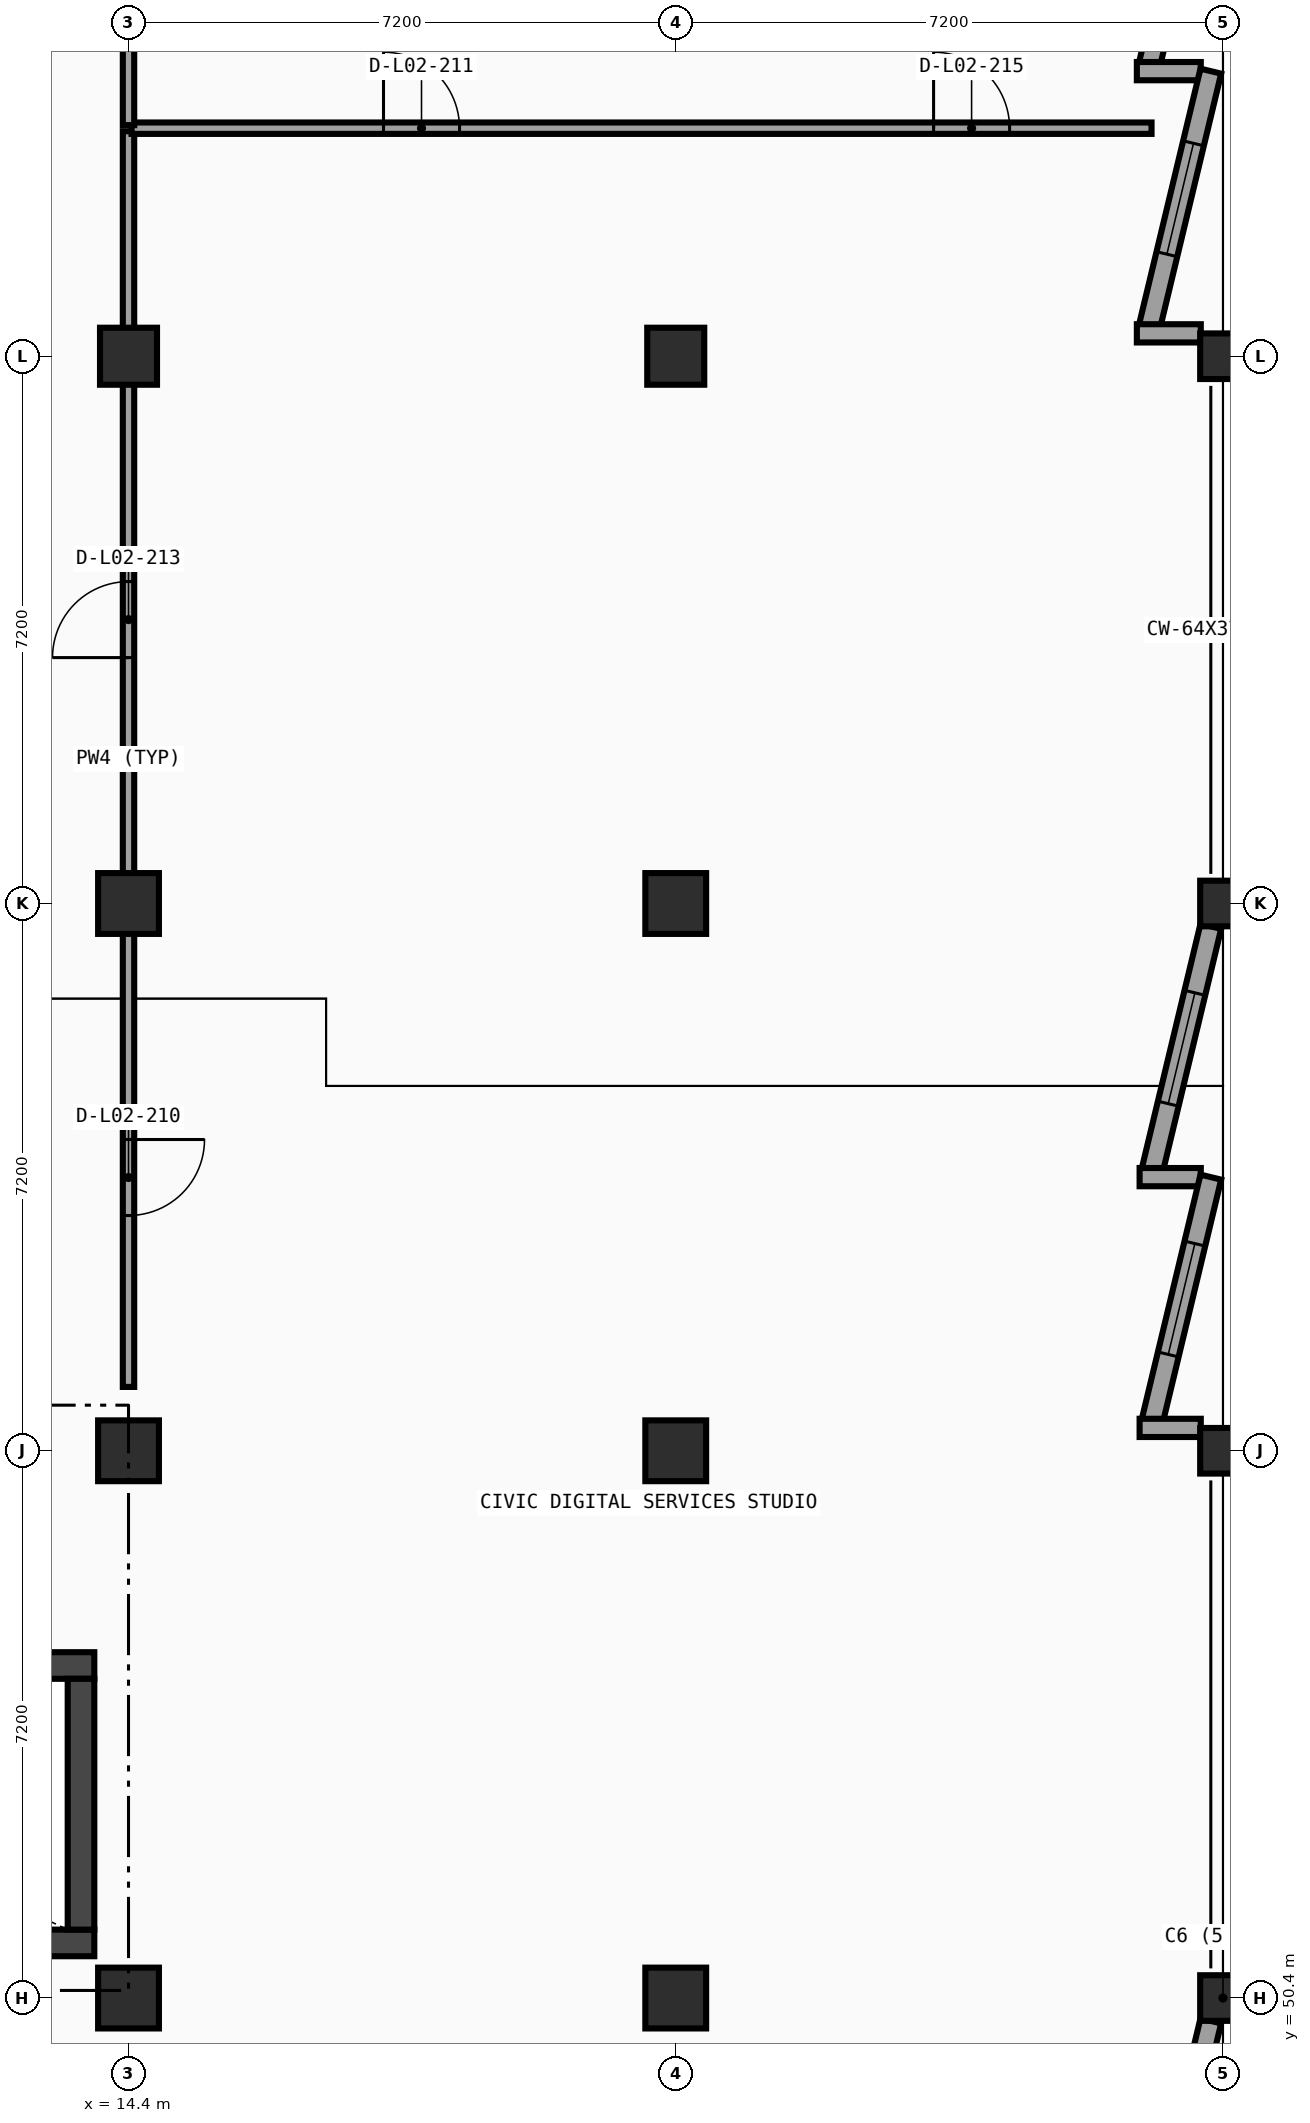
"""IFC4 building model, lengths in metres.
Left out: names, types, materials, properties, quantities, classifications, styles, units other than length and angle.
Written with IfcOpenShell. Run it as: python <this file> out.ifc"""

import sys

from ifc_helpers import new_model, si_unit, direction, frame, frame_2d, origin, origin_2d, place, context, subcontext, project, spatial, rectangle, extrude, element, fill, save


model = new_model("IFC4")
c1 = context("Model", 3, precision=1e-05, world=origin(), true_north=direction((0.0, 1.0)))
c2 = subcontext(c1, "Body", "Model", "MODEL_VIEW")
j1 = project(units=[si_unit("LENGTHUNIT", "METRE"), si_unit("PLANEANGLEUNIT", "RADIAN")], contexts=[c1])
p1 = place(None, origin())
s1 = spatial("IfcSite", under=j1, at=p1, CompositionType="ELEMENT")
p2 = place(p1, origin())
s2 = spatial("IfcBuilding", under=s1, at=p2, CompositionType="ELEMENT")
p3 = place(p2, frame((0.0, 0.0, 10.2)))
s3 = spatial("IfcBuildingStorey", under=s2, at=p3, CompositionType="ELEMENT", Elevation=10.2)
for number, where, z_axis, x_axis in (
    (1, (14.4, 50.4, 0.0), (0.0, 0.0, 1.0), (1.0, 0.0, 0.0)),
    (2, (14.4, 57.6, 0.0), (0.0, 0.0, 1.0), (1.0, 0.0, 0.0)),
    (3, (14.4, 64.8, 0.0), (0.0, 0.0, 1.0), (1.0, 0.0, 0.0)),
):
    element("IfcColumn", number, at=place(p3, frame(where, z_axis=z_axis, x_axis=x_axis)), inside=s3, PredefinedType="COLUMN", context=c2, shape_type="SweptSolid", body=[
        extrude(rectangle(XDim=0.8, YDim=0.8, at=origin_2d()), origin(), (0.0, 0.0, 1.0), 4.5),
    ])
p4 = place(p3, frame((14.4, 72.0, 0.0), z_axis=(0.0, 0.0, 1.0), x_axis=(1.0, 0.0, 0.0)))
e4 = element("IfcColumn", 4, at=p4, inside=s3, PredefinedType="COLUMN", context=c2, shape_type="SweptSolid", body=[
    extrude(rectangle(XDim=0.75, YDim=0.75, at=origin_2d()), origin(), (0.0, 0.0, 1.0), 4.5),
])
for number, where, z_axis, x_axis in (
    (5, (21.6, 50.4, 0.0), (0.0, 0.0, 1.0), (1.0, 0.0, 0.0)),
    (6, (21.6, 57.6, 0.0), (0.0, 0.0, 1.0), (1.0, 0.0, 0.0)),
    (7, (21.6, 64.8, 0.0), (0.0, 0.0, 1.0), (1.0, 0.0, 0.0)),
):
    element("IfcColumn", number, at=place(p3, frame(where, z_axis=z_axis, x_axis=x_axis)), inside=s3, PredefinedType="COLUMN", context=c2, shape_type="SweptSolid", body=[
        extrude(rectangle(XDim=0.8, YDim=0.8, at=origin_2d()), origin(), (0.0, 0.0, 1.0), 4.5),
    ])
p5 = place(p3, frame((21.6, 72.0, 0.0), z_axis=(0.0, 0.0, 1.0), x_axis=(1.0, 0.0, 0.0)))
e8 = element("IfcColumn", 8, at=p5, inside=s3, PredefinedType="COLUMN", context=c2, shape_type="SweptSolid", body=[
    extrude(rectangle(XDim=0.75, YDim=0.75, at=origin_2d()), origin(), (0.0, 0.0, 1.0), 4.5),
])
for number, where, z_axis, x_axis in (
    (9, (28.8, 50.4, 0.0), (0.0, 0.0, 1.0), (1.0, 0.0, 0.0)),
    (10, (28.8, 57.6, 0.0), (0.0, 0.0, 1.0), (1.0, 0.0, 0.0)),
    (11, (28.8, 64.8, 0.0), (0.0, 0.0, 1.0), (1.0, 0.0, 0.0)),
    (12, (28.8, 72.0, 0.0), (0.0, 0.0, 1.0), (1.0, 0.0, 0.0)),
):
    element("IfcColumn", number, at=place(p3, frame(where, z_axis=z_axis, x_axis=x_axis)), inside=s3, PredefinedType="COLUMN", context=c2, shape_type="SweptSolid", body=[
        extrude(rectangle(XDim=0.6, YDim=0.6, at=origin_2d()), origin(), (0.0, 0.0, 1.0), 4.5),
    ])
p6 = place(p3, frame((28.64, 79.2, 0.0), z_axis=(0.0, 0.0, 1.0), x_axis=(-0.233439818328, -0.972371251744, 0.0)))
e13 = element("IfcWall", 13, at=p6, inside=s3, PredefinedType="SOLIDWALL", context=c2, shape_type="SweptSolid", body=[
    extrude(rectangle(XDim=3.452, YDim=0.28, at=frame_2d((1.726, 0.0))), origin(), (0.0, 0.0, 1.0), 3.618),
])
p7 = place(p6, frame((0.976, 0.0, 0.8)))
e14 = element("IfcOpeningElement", 14, at=p7, cuts=e13, PredefinedType="OPENING", context=c2, shape_type="SweptSolid", body=[
    extrude(rectangle(XDim=1.5, YDim=1.7, at=frame_2d((0.75, 0.85))), frame((0.0, 0.15, 0.0), z_axis=(0.0, -1.0, 0.0), x_axis=(1.0, 0.0, 0.0)), (0.0, 0.0, 1.0), 0.3),
])
p8 = place(p3, frame((27.667, 75.75, 0.0), z_axis=(0.0, 0.0, 1.0), x_axis=(1.0, 0.0, 0.0)))
e15 = element("IfcWall", 15, at=p8, inside=s3, PredefinedType="SOLIDWALL", context=c2, shape_type="SweptSolid", body=[
    extrude(rectangle(XDim=0.841, YDim=0.24, at=frame_2d((0.421, 0.0))), origin(), (0.0, 0.0, 1.0), 4.24),
])
p9 = place(p3, frame((28.64, 75.75, 0.0), z_axis=(0.0, 0.0, 1.0), x_axis=(-0.23342376713, -0.972375105059, 0.0)))
e16 = element("IfcWall", 16, at=p9, inside=s3, PredefinedType="SOLIDWALL", context=c2, shape_type="SweptSolid", body=[
    extrude(rectangle(XDim=3.453, YDim=0.28, at=frame_2d((1.726, 0.0))), origin(), (0.0, 0.0, 1.0), 3.618),
])
p10 = place(p9, frame((0.976, 0.0, 0.8)))
e17 = element("IfcOpeningElement", 17, at=p10, cuts=e16, PredefinedType="OPENING", context=c2, shape_type="SweptSolid", body=[
    extrude(rectangle(XDim=1.5, YDim=1.7, at=frame_2d((0.75, 0.85))), frame((0.0, 0.15, 0.0), z_axis=(0.0, -1.0, 0.0), x_axis=(1.0, 0.0, 0.0)), (0.0, 0.0, 1.0), 0.3),
])
p11 = place(p3, frame((27.667, 72.301, 0.0), z_axis=(0.0, 0.0, 1.0), x_axis=(1.0, 0.0, 0.0)))
e18 = element("IfcWall", 18, at=p11, inside=s3, PredefinedType="SOLIDWALL", context=c2, shape_type="SweptSolid", body=[
    extrude(rectangle(XDim=0.841, YDim=0.24, at=frame_2d((0.421, 0.0))), origin(), (0.0, 0.0, 1.0), 3.618),
])
p12 = place(p3, frame((28.64, 64.499, 0.0), z_axis=(0.0, 0.0, 1.0), x_axis=(-0.23343175428, -0.972373187667, 0.0)))
e19 = element("IfcWall", 19, at=p12, inside=s3, PredefinedType="SOLIDWALL", context=c2, shape_type="SweptSolid", body=[
    extrude(rectangle(XDim=3.298, YDim=0.28, at=frame_2d((1.649, 0.0))), origin(), (0.0, 0.0, 1.0), 3.696),
])
p13 = place(p12, frame((0.899, 0.0, 0.8)))
e20 = element("IfcOpeningElement", 20, at=p13, cuts=e19, PredefinedType="OPENING", context=c2, shape_type="SweptSolid", body=[
    extrude(rectangle(XDim=1.5, YDim=1.7, at=frame_2d((0.75, 0.85))), frame((0.0, 0.15, 0.0), z_axis=(0.0, -1.0, 0.0), x_axis=(1.0, 0.0, 0.0)), (0.0, 0.0, 1.0), 0.3),
])
p14 = place(p3, frame((27.703, 61.2, 0.0), z_axis=(0.0, 0.0, 1.0), x_axis=(1.0, 0.0, 0.0)))
e21 = element("IfcWall", 21, at=p14, inside=s3, PredefinedType="SOLIDWALL", context=c2, shape_type="SweptSolid", body=[
    extrude(rectangle(XDim=0.805, YDim=0.24, at=frame_2d((0.403, 0.0))), origin(), (0.0, 0.0, 1.0), 4.24),
])
p15 = place(p3, frame((28.64, 61.2, 0.0), z_axis=(0.0, 0.0, 1.0), x_axis=(-0.23343175428, -0.972373187667, 0.0)))
e22 = element("IfcWall", 22, at=p15, inside=s3, PredefinedType="SOLIDWALL", context=c2, shape_type="SweptSolid", body=[
    extrude(rectangle(XDim=3.298, YDim=0.28, at=frame_2d((1.649, 0.0))), origin(), (0.0, 0.0, 1.0), 3.618),
])
p16 = place(p15, frame((0.899, 0.0, 0.8)))
e23 = element("IfcOpeningElement", 23, at=p16, cuts=e22, PredefinedType="OPENING", context=c2, shape_type="SweptSolid", body=[
    extrude(rectangle(XDim=1.5, YDim=1.7, at=frame_2d((0.75, 0.85))), frame((0.0, 0.15, 0.0), z_axis=(0.0, -1.0, 0.0), x_axis=(1.0, 0.0, 0.0)), (0.0, 0.0, 1.0), 0.3),
])
p17 = place(p3, frame((27.703, 57.901, 0.0), z_axis=(0.0, 0.0, 1.0), x_axis=(1.0, 0.0, 0.0)))
e24 = element("IfcWall", 24, at=p17, inside=s3, PredefinedType="SOLIDWALL", context=c2, shape_type="SweptSolid", body=[
    extrude(rectangle(XDim=0.805, YDim=0.24, at=frame_2d((0.403, 0.0))), origin(), (0.0, 0.0, 1.0), 3.618),
])
p18 = place(p3, frame((28.64, 50.099, 0.0), z_axis=(0.0, 0.0, 1.0), x_axis=(-0.23342376713, -0.972375105059, 0.0)))
e25 = element("IfcWall", 25, at=p18, inside=s3, PredefinedType="SOLIDWALL", context=c2, shape_type="SweptSolid", body=[
    extrude(rectangle(XDim=3.453, YDim=0.28, at=frame_2d((1.726, 0.0))), origin(), (0.0, 0.0, 1.0), 3.696),
])
p19 = place(p18, frame((0.876, 0.0, 0.8)))
e26 = element("IfcOpeningElement", 26, at=p19, cuts=e25, PredefinedType="OPENING", context=c2, shape_type="SweptSolid", body=[
    extrude(rectangle(XDim=1.7, YDim=1.85, at=frame_2d((0.85, 0.925))), frame((0.0, 0.15, 0.0), z_axis=(0.0, -1.0, 0.0), x_axis=(1.0, 0.0, 0.0)), (0.0, 0.0, 1.0), 0.3),
])
for number, where, z_axis, x_axis in (
    (27, (4.65, 51.125, 0.0), (0.0, 0.0, 1.0), (1.0, 0.0, 0.0)),
    (28, (13.95, 54.775, 0.0), (0.0, 0.0, 1.0), (-1.0, 0.0, 0.0)),
):
    element("IfcWall", number, at=place(p3, frame(where, z_axis=z_axis, x_axis=x_axis)), inside=s3, PredefinedType="SHEAR", context=c2, shape_type="SweptSolid", body=[
        extrude(rectangle(XDim=9.3, YDim=0.35, at=frame_2d((4.65, 0.0))), origin(), (0.0, 0.0, 1.0), 4.24),
    ])
p20 = place(p3, frame((13.775, 51.3, 0.0), z_axis=(0.0, 0.0, 1.0), x_axis=(0.0, 1.0, 0.0)))
e29 = element("IfcWall", 29, at=p20, inside=s3, PredefinedType="SHEAR", context=c2, shape_type="SweptSolid", body=[
    extrude(rectangle(XDim=3.3, YDim=0.35, at=frame_2d((1.65, 0.0))), origin(), (0.0, 0.0, 1.0), 4.24),
])
p21 = place(p3, frame((14.4, 58.44, 0.0), z_axis=(0.0, 0.0, 1.0), x_axis=(0.0, 1.0, 0.0)))
e30 = element("IfcWall", 30, at=p21, inside=s3, PredefinedType="PARTITIONING", context=c2, shape_type="SweptSolid", body=[
    extrude(rectangle(XDim=16.52, YDim=0.15, at=frame_2d((8.26, 0.0))), origin(), (0.0, 0.0, 1.0), 3.451),
])
p22 = place(p21, frame((2.255, 0.0, 0.0)))
e31 = element("IfcOpeningElement", 31, at=p22, cuts=e30, PredefinedType="OPENING", context=c2, shape_type="SweptSolid", body=[
    extrude(rectangle(XDim=1.0, YDim=2.1, at=frame_2d((0.5, 1.05))), frame((0.0, 0.085, 0.0), z_axis=(0.0, -1.0, 0.0), x_axis=(1.0, 0.0, 0.0)), (0.0, 0.0, 1.0), 0.17),
])
p23 = place(p21, frame((9.595, 0.0, 0.0)))
e32 = element("IfcOpeningElement", 32, at=p23, cuts=e30, PredefinedType="OPENING", context=c2, shape_type="SweptSolid", body=[
    extrude(rectangle(XDim=1.0, YDim=2.1, at=frame_2d((0.5, 1.05))), frame((0.0, 0.085, 0.0), z_axis=(0.0, -1.0, 0.0), x_axis=(1.0, 0.0, 0.0)), (0.0, 0.0, 1.0), 0.17),
])
p24 = place(p3, frame((14.44, 75.0, 0.0), z_axis=(0.0, 0.0, 1.0), x_axis=(1.0, 0.0, 0.0)))
e33 = element("IfcWall", 33, at=p24, inside=s3, PredefinedType="PARTITIONING", context=c2, shape_type="SweptSolid", body=[
    extrude(rectangle(XDim=13.42, YDim=0.15, at=frame_2d((6.71, 0.0))), origin(), (0.0, 0.0, 1.0), 3.451),
])
p25 = place(p24, frame((3.315, 0.0, 0.0)))
e34 = element("IfcOpeningElement", 34, at=p25, cuts=e33, PredefinedType="OPENING", context=c2, shape_type="SweptSolid", body=[
    extrude(rectangle(XDim=1.0, YDim=2.1, at=frame_2d((0.5, 1.05))), frame((0.0, 0.085, 0.0), z_axis=(0.0, -1.0, 0.0), x_axis=(1.0, 0.0, 0.0)), (0.0, 0.0, 1.0), 0.17),
])
p26 = place(p24, frame((10.552, 0.0, 0.0)))
e35 = element("IfcOpeningElement", 35, at=p26, cuts=e33, PredefinedType="OPENING", context=c2, shape_type="SweptSolid", body=[
    extrude(rectangle(XDim=1.0, YDim=2.1, at=frame_2d((0.5, 1.05))), frame((0.0, 0.085, 0.0), z_axis=(0.0, -1.0, 0.0), x_axis=(1.0, 0.0, 0.0)), (0.0, 0.0, 1.0), 0.17),
])
p27 = place(p3, frame((14.4, 75.04, 0.0), z_axis=(0.0, 0.0, 1.0), x_axis=(0.0, 1.0, 0.0)))
e36 = element("IfcWall", 36, at=p27, inside=s3, PredefinedType="PARTITIONING", context=c2, shape_type="SweptSolid", body=[
    extrude(rectangle(XDim=11.32, YDim=0.15, at=frame_2d((5.66, 0.0))), origin(), (0.0, 0.0, 1.0), 3.451),
])
p28 = place(p10, origin())
e37 = element("IfcWindow", 37, at=p28, inside=s3, PartitioningType="SINGLE_PANEL", PredefinedType="WINDOW", context=c2, shape_type="SweptSolid", body=[
    extrude(rectangle(XDim=1.5, YDim=1.7, at=frame_2d((0.75, 0.85))), frame((0.0, 0.03, 0.0), z_axis=(0.0, -1.0, 0.0), x_axis=(1.0, 0.0, 0.0)), (0.0, 0.0, 1.0), 0.06),
])
fill(e17, e37)
p29 = place(p13, origin())
e38 = element("IfcWindow", 38, at=p29, inside=s3, PartitioningType="SINGLE_PANEL", PredefinedType="WINDOW", context=c2, shape_type="SweptSolid", body=[
    extrude(rectangle(XDim=1.5, YDim=1.7, at=frame_2d((0.75, 0.85))), frame((0.0, 0.03, 0.0), z_axis=(0.0, -1.0, 0.0), x_axis=(1.0, 0.0, 0.0)), (0.0, 0.0, 1.0), 0.06),
])
fill(e20, e38)
p30 = place(p16, origin())
e39 = element("IfcWindow", 39, at=p30, inside=s3, PartitioningType="SINGLE_PANEL", PredefinedType="WINDOW", context=c2, shape_type="SweptSolid", body=[
    extrude(rectangle(XDim=1.5, YDim=1.7, at=frame_2d((0.75, 0.85))), frame((0.0, 0.03, 0.0), z_axis=(0.0, -1.0, 0.0), x_axis=(1.0, 0.0, 0.0)), (0.0, 0.0, 1.0), 0.06),
])
fill(e23, e39)
p31 = place(p22, origin())
e40 = element("IfcDoor", 40, at=p31, inside=s3, OperationType="SINGLE_SWING_RIGHT", PredefinedType="DOOR", context=c2, shape_type="SweptSolid", body=[
    extrude(rectangle(XDim=1.0, YDim=2.1, at=frame_2d((0.5, 1.05))), frame((0.0, 0.025, 0.0), z_axis=(0.0, -1.0, 0.0), x_axis=(1.0, 0.0, 0.0)), (0.0, 0.0, 1.0), 0.05),
])
fill(e31, e40)
p32 = place(p25, origin())
e41 = element("IfcDoor", 41, at=p32, inside=s3, OperationType="SINGLE_SWING_LEFT", PredefinedType="DOOR", context=c2, shape_type="SweptSolid", body=[
    extrude(rectangle(XDim=1.0, YDim=2.1, at=frame_2d((0.5, 1.05))), frame((0.0, 0.025, 0.0), z_axis=(0.0, -1.0, 0.0), x_axis=(1.0, 0.0, 0.0)), (0.0, 0.0, 1.0), 0.05),
])
fill(e34, e41)
p33 = place(p23, origin())
e42 = element("IfcDoor", 42, at=p33, inside=s3, OperationType="SINGLE_SWING_LEFT", PredefinedType="DOOR", context=c2, shape_type="SweptSolid", body=[
    extrude(rectangle(XDim=1.0, YDim=2.1, at=frame_2d((0.5, 1.05))), frame((0.0, 0.025, 0.0), z_axis=(0.0, -1.0, 0.0), x_axis=(1.0, 0.0, 0.0)), (0.0, 0.0, 1.0), 0.05),
])
fill(e32, e42)
p34 = place(p26, origin())
e43 = element("IfcDoor", 43, at=p34, inside=s3, OperationType="SINGLE_SWING_LEFT", PredefinedType="DOOR", context=c2, shape_type="SweptSolid", body=[
    extrude(rectangle(XDim=1.0, YDim=2.1, at=frame_2d((0.5, 1.05))), frame((0.0, 0.025, 0.0), z_axis=(0.0, -1.0, 0.0), x_axis=(1.0, 0.0, 0.0)), (0.0, 0.0, 1.0), 0.05),
])
fill(e35, e43)
save(model, sys.argv[1])
